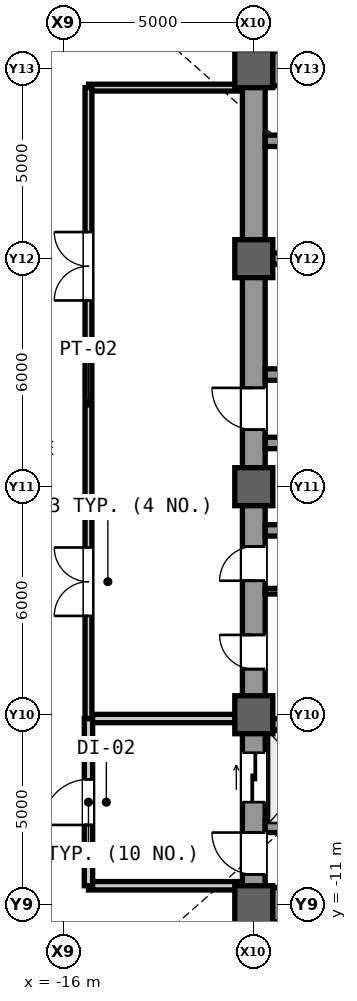
"""IFC4 building model, lengths in metres.
Left out: names, types, materials, properties, quantities, classifications, styles, units other than length and angle.
Written with IfcOpenShell. Run it as: python <this file> out.ifc"""

import sys

from ifc_helpers import new_model, si_unit, direction, frame, frame_2d, origin, origin_2d, place, context, subcontext, project, spatial, rectangle, extrude, source, transform, mapped, element, fill, save


model = new_model("IFC4")
c1 = context("Model", 3, precision=1e-05, world=origin(), true_north=direction((0.0, 1.0)))
c2 = subcontext(c1, "Body", "Model", "MODEL_VIEW")
j1 = project(units=[si_unit("LENGTHUNIT", "METRE"), si_unit("PLANEANGLEUNIT", "RADIAN")], contexts=[c1])
p1 = place(None, origin())
s1 = spatial("IfcSite", under=j1, at=p1, CompositionType="ELEMENT")
p2 = place(p1, origin())
s2 = spatial("IfcBuilding", under=s1, at=p2, CompositionType="ELEMENT")
p3 = place(p2, frame((0.0, 0.0, -9.6)))
s3 = spatial("IfcBuildingStorey", under=s2, at=p3, CompositionType="ELEMENT", Elevation=-9.6)
m1 = source(origin(), c2, "Body", "SweptSolid", [
    extrude(rectangle(XDim=22.0, YDim=0.6, at=frame_2d((11.0, 0.0))), origin(), (0.0, 0.0, 1.0), 4.48),
])
p4 = place(p3, frame((-11.0, -11.0, 0.0), z_axis=(0.0, 0.0, 1.0), x_axis=(0.0, 1.0, 0.0)))
e1 = element("IfcWall", 1, at=p4, inside=s3, PredefinedType="SHEAR", context=c2, shape_type="MappedRepresentation", body=[
    mapped(m1, transform((0.0, 0.0, 0.0), scale=1.0)),
])
m2 = source(origin(), c2, "Body", "SweptSolid", [
    extrude(rectangle(XDim=1.1, YDim=2.2, at=frame_2d((0.55, 1.1))), frame((0.0, 0.31, 0.0), z_axis=(0.0, -1.0, 0.0), x_axis=(1.0, 0.0, 0.0)), (0.0, 0.0, 1.0), 0.62),
])
p5 = place(p4, frame((0.8, 0.0, 0.0)))
e2 = element("IfcOpeningElement", 2, at=p5, cuts=e1, PredefinedType="OPENING", context=c2, shape_type="MappedRepresentation", body=[
    mapped(m2, transform((0.0, 0.0, 0.0), scale=1.0)),
])
p6 = place(p4, frame((12.5, 0.0, 0.0)))
e3 = element("IfcOpeningElement", 3, at=p6, cuts=e1, PredefinedType="OPENING", context=c2, shape_type="MappedRepresentation", body=[
    mapped(m2, transform((0.0, 0.0, 0.0), scale=1.0)),
])
m3 = source(origin(), c2, "Body", "SweptSolid", [
    extrude(rectangle(XDim=0.9, YDim=2.15, at=frame_2d((0.45, 1.075))), frame((0.0, 0.31, 0.0), z_axis=(0.0, -1.0, 0.0), x_axis=(1.0, 0.0, 0.0)), (0.0, 0.0, 1.0), 0.62),
])
p7 = place(p4, frame((6.2, 0.0, 0.0)))
e4 = element("IfcOpeningElement", 4, at=p7, cuts=e1, PredefinedType="OPENING", context=c2, shape_type="MappedRepresentation", body=[
    mapped(m3, transform((0.0, 0.0, 0.0), scale=1.0)),
])
p8 = place(p4, frame((8.525, 0.0, 0.0)))
e5 = element("IfcOpeningElement", 5, at=p8, cuts=e1, PredefinedType="OPENING", context=c2, shape_type="MappedRepresentation", body=[
    mapped(m3, transform((0.0, 0.0, 0.0), scale=1.0)),
])
m4 = source(origin(), c2, "Body", "SweptSolid", [
    extrude(rectangle(XDim=1.3, YDim=2.3, at=frame_2d((0.65, 1.15))), frame((0.0, 0.31, 0.0), z_axis=(0.0, -1.0, 0.0), x_axis=(1.0, 0.0, 0.0)), (0.0, 0.0, 1.0), 0.62),
])
p9 = place(p4, frame((2.7, 0.0, 0.0)))
e6 = element("IfcOpeningElement", 6, at=p9, cuts=e1, PredefinedType="OPENING", context=c2, shape_type="MappedRepresentation", body=[
    mapped(m4, transform((0.0, 0.0, 0.0), scale=1.0)),
])
m5 = source(origin(), c2, "Body", "SweptSolid", [
    extrude(rectangle(XDim=5.85, YDim=0.9, at=frame_2d((2.925, 0.0))), origin(), (0.0, 0.0, 1.0), 4.48),
])
for number, where, z_axis, x_axis in (
    (7, (-10.7, -11.0, 0.0), (0.0, 0.0, 1.0), (1.0, 0.0, 0.0)),
    (8, (-10.7, 11.0, 0.0), (0.0, 0.0, 1.0), (1.0, 0.0, 0.0)),
):
    element("IfcWall", number, at=place(p3, frame(where, z_axis=z_axis, x_axis=x_axis)), inside=s3, PredefinedType="SHEAR", context=c2, shape_type="MappedRepresentation", body=[
        mapped(m5, transform((0.0, 0.0, 0.0), scale=1.0)),
    ])
m6 = source(origin(), c2, "Body", "SweptSolid", [
    extrude(rectangle(XDim=5.6, YDim=0.3, at=frame_2d((2.8, 0.0))), origin(), (0.0, 0.0, 1.0), 4.48),
])
for number, where, z_axis, x_axis in (
    (9, (-10.7, -1.15, 0.0), (0.0, 0.0, 1.0), (1.0, 0.0, 0.0)),
    (10, (-10.7, 1.15, 0.0), (0.0, 0.0, 1.0), (1.0, 0.0, 0.0)),
):
    element("IfcWall", number, at=place(p3, frame(where, z_axis=z_axis, x_axis=x_axis)), inside=s3, PredefinedType="SHEAR", context=c2, shape_type="MappedRepresentation", body=[
        mapped(m6, transform((0.0, 0.0, 0.0), scale=1.0)),
    ])
m7 = source(origin(), c2, "Body", "SweptSolid", [
    extrude(rectangle(XDim=1.0, YDim=1.0, at=origin_2d()), origin(), (0.0, 0.0, 1.0), 4.8),
])
for number, where, z_axis, x_axis in (
    (11, (-11.0, -11.0, 0.0), (0.0, 0.0, 1.0), (1.0, 0.0, 0.0)),
    (12, (-11.0, -6.0, 0.0), (0.0, 0.0, 1.0), (1.0, 0.0, 0.0)),
    (13, (-11.0, 0.0, 0.0), (0.0, 0.0, 1.0), (1.0, 0.0, 0.0)),
    (14, (-11.0, 6.0, 0.0), (0.0, 0.0, 1.0), (1.0, 0.0, 0.0)),
    (15, (-11.0, 11.0, 0.0), (0.0, 0.0, 1.0), (1.0, 0.0, 0.0)),
):
    element("IfcColumn", number, at=place(p3, frame(where, z_axis=z_axis, x_axis=x_axis)), inside=s3, PredefinedType="COLUMN", context=c2, shape_type="MappedRepresentation", body=[
        mapped(m7, transform((0.0, 0.0, 0.0), scale=1.0)),
    ])
m8 = source(origin(), c2, "Body", "SweptSolid", [
    extrude(rectangle(XDim=2.2, YDim=0.3, at=frame_2d((1.1, 0.0))), origin(), (0.0, 0.0, 1.0), 4.48),
])
for number, where, z_axis, x_axis in (
    (16, (-10.7, -8.95, 0.0), (0.0, 0.0, 1.0), (1.0, 0.0, 0.0)),
    (17, (-10.7, -6.25, 0.0), (0.0, 0.0, 1.0), (1.0, 0.0, 0.0)),
    (18, (-10.7, 2.95, 0.0), (0.0, 0.0, 1.0), (1.0, 0.0, 0.0)),
    (19, (-10.7, 6.0, 0.0), (0.0, 0.0, 1.0), (1.0, 0.0, 0.0)),
    (20, (-10.7, 9.1, 0.0), (0.0, 0.0, 1.0), (1.0, 0.0, 0.0)),
):
    element("IfcWall", number, at=place(p3, frame(where, z_axis=z_axis, x_axis=x_axis)), inside=s3, PredefinedType="SHEAR", context=c2, shape_type="MappedRepresentation", body=[
        mapped(m8, transform((0.0, 0.0, 0.0), scale=1.0)),
    ])
m9 = source(origin(), c2, "Body", "SweptSolid", [
    extrude(rectangle(XDim=2.05, YDim=0.15, at=frame_2d((1.025, 0.0))), origin(), (0.0, 0.0, 1.0), 4.48),
])
p10 = place(p3, frame((-10.7, -2.75, 0.0), z_axis=(0.0, 0.0, 1.0), x_axis=(1.0, 0.0, 0.0)))
e21 = element("IfcWall", 21, at=p10, inside=s3, PredefinedType="PARTITIONING", context=c2, shape_type="MappedRepresentation", body=[
    mapped(m9, transform((0.0, 0.0, 0.0), scale=1.0)),
])
m10 = source(origin(), c2, "Body", "SweptSolid", [
    extrude(rectangle(XDim=4.05, YDim=0.22, at=frame_2d((2.025, 0.0))), origin(), (0.0, 0.0, 1.0), 4.48),
])
for number, where, z_axis, x_axis in (
    (22, (-15.35, -10.5, 0.0), (0.0, 0.0, 1.0), (1.0, 0.0, 0.0)),
    (23, (-15.35, -6.1, 0.0), (0.0, 0.0, 1.0), (1.0, 0.0, 0.0)),
):
    element("IfcWall", number, at=place(p3, frame(where, z_axis=z_axis, x_axis=x_axis)), inside=s3, PredefinedType="PARTITIONING", context=c2, shape_type="MappedRepresentation", body=[
        mapped(m10, transform((0.0, 0.0, 0.0), scale=1.0)),
    ])
m11 = source(origin(), c2, "Body", "SweptSolid", [
    extrude(rectangle(XDim=4.4, YDim=0.22, at=frame_2d((2.2, 0.0))), origin(), (0.0, 0.0, 1.0), 4.48),
])
p11 = place(p3, frame((-15.35, -10.5, 0.0), z_axis=(0.0, 0.0, 1.0), x_axis=(0.0, 1.0, 0.0)))
e24 = element("IfcWall", 24, at=p11, inside=s3, PredefinedType="PARTITIONING", context=c2, shape_type="MappedRepresentation", body=[
    mapped(m11, transform((0.0, 0.0, 0.0), scale=1.0)),
])
m12 = source(origin(), c2, "Body", "SweptSolid", [
    extrude(rectangle(XDim=1.2, YDim=2.2, at=frame_2d((0.6, 1.1))), frame((0.0, 0.12, 0.0), z_axis=(0.0, -1.0, 0.0), x_axis=(1.0, 0.0, 0.0)), (0.0, 0.0, 1.0), 0.24),
])
p12 = place(p11, frame((1.6, 0.0, 0.0)))
e25 = element("IfcOpeningElement", 25, at=p12, cuts=e24, PredefinedType="OPENING", context=c2, shape_type="MappedRepresentation", body=[
    mapped(m12, transform((0.0, 0.0, 0.0), scale=1.0)),
])
m13 = source(origin(), c2, "Body", "SweptSolid", [
    extrude(rectangle(XDim=4.05, YDim=0.18, at=frame_2d((2.025, 0.0))), origin(), (0.0, 0.0, 1.0), 4.48),
])
p13 = place(p3, frame((-15.35, 10.5, 0.0), z_axis=(0.0, 0.0, 1.0), x_axis=(1.0, 0.0, 0.0)))
e26 = element("IfcWall", 26, at=p13, inside=s3, PredefinedType="PARTITIONING", context=c2, shape_type="MappedRepresentation", body=[
    mapped(m13, transform((0.0, 0.0, 0.0), scale=1.0)),
])
m14 = source(origin(), c2, "Body", "SweptSolid", [
    extrude(rectangle(XDim=16.6, YDim=0.18, at=frame_2d((8.3, 0.0))), origin(), (0.0, 0.0, 1.0), 4.48),
])
p14 = place(p3, frame((-15.35, -6.1, 0.0), z_axis=(0.0, 0.0, 1.0), x_axis=(0.0, 1.0, 0.0)))
e27 = element("IfcWall", 27, at=p14, inside=s3, PredefinedType="PARTITIONING", context=c2, shape_type="MappedRepresentation", body=[
    mapped(m14, transform((0.0, 0.0, 0.0), scale=1.0)),
])
m15 = source(origin(), c2, "Body", "SweptSolid", [
    extrude(rectangle(XDim=1.8, YDim=2.25, at=frame_2d((0.9, 1.125))), frame((0.0, 0.1, 0.0), z_axis=(0.0, -1.0, 0.0), x_axis=(1.0, 0.0, 0.0)), (0.0, 0.0, 1.0), 0.2),
])
p15 = place(p14, frame((2.7, 0.0, 0.0)))
e28 = element("IfcOpeningElement", 28, at=p15, cuts=e27, PredefinedType="OPENING", context=c2, shape_type="MappedRepresentation", body=[
    mapped(m15, transform((0.0, 0.0, 0.0), scale=1.0)),
])
p16 = place(p14, frame((11.0, 0.0, 0.0)))
e29 = element("IfcOpeningElement", 29, at=p16, cuts=e27, PredefinedType="OPENING", context=c2, shape_type="MappedRepresentation", body=[
    mapped(m15, transform((0.0, 0.0, 0.0), scale=1.0)),
])
m16 = source(origin(), c2, "Body", "SweptSolid", [
    extrude(rectangle(XDim=1.1, YDim=2.2, at=frame_2d((0.55, 1.1))), frame((0.0, 0.025, 0.0), z_axis=(0.0, -1.0, 0.0), x_axis=(1.0, 0.0, 0.0)), (0.0, 0.0, 1.0), 0.05),
])
p17 = place(p5, origin())
e30 = element("IfcDoor", 30, at=p17, inside=s3, OperationType="SINGLE_SWING_RIGHT", PredefinedType="DOOR", context=c2, shape_type="MappedRepresentation", body=[
    mapped(m16, transform((0.0, 0.0, 0.0), scale=1.0)),
])
fill(e2, e30)
p18 = place(p6, origin())
e31 = element("IfcDoor", 31, at=p18, inside=s3, OperationType="SINGLE_SWING_RIGHT", PredefinedType="DOOR", context=c2, shape_type="MappedRepresentation", body=[
    mapped(m16, transform((0.0, 0.0, 0.0), scale=1.0)),
])
fill(e3, e31)
m17 = source(origin(), c2, "Body", "SweptSolid", [
    extrude(rectangle(XDim=0.9, YDim=2.15, at=frame_2d((0.45, 1.075))), frame((0.0, 0.025, 0.0), z_axis=(0.0, -1.0, 0.0), x_axis=(1.0, 0.0, 0.0)), (0.0, 0.0, 1.0), 0.05),
])
p19 = place(p7, origin())
e32 = element("IfcDoor", 32, at=p19, inside=s3, OperationType="SINGLE_SWING_RIGHT", PredefinedType="DOOR", context=c2, shape_type="MappedRepresentation", body=[
    mapped(m17, transform((0.0, 0.0, 0.0), scale=1.0)),
])
fill(e4, e32)
p20 = place(p8, origin())
e33 = element("IfcDoor", 33, at=p20, inside=s3, OperationType="SINGLE_SWING_LEFT", PredefinedType="DOOR", context=c2, shape_type="MappedRepresentation", body=[
    mapped(m17, transform((0.0, 0.0, 0.0), scale=1.0)),
])
fill(e5, e33)
m18 = source(origin(), c2, "Body", "SweptSolid", [
    extrude(rectangle(XDim=1.2, YDim=2.2, at=frame_2d((0.6, 1.1))), frame((0.0, 0.025, 0.0), z_axis=(0.0, -1.0, 0.0), x_axis=(1.0, 0.0, 0.0)), (0.0, 0.0, 1.0), 0.05),
])
p21 = place(p12, origin())
e34 = element("IfcDoor", 34, at=p21, inside=s3, OperationType="SINGLE_SWING_LEFT", PredefinedType="DOOR", context=c2, shape_type="MappedRepresentation", body=[
    mapped(m18, transform((0.0, 0.0, 0.0), scale=1.0)),
])
fill(e25, e34)
m19 = source(origin(), c2, "Body", "SweptSolid", [
    extrude(rectangle(XDim=1.8, YDim=2.25, at=frame_2d((0.9, 1.125))), frame((0.0, 0.025, 0.0), z_axis=(0.0, -1.0, 0.0), x_axis=(1.0, 0.0, 0.0)), (0.0, 0.0, 1.0), 0.05),
])
p22 = place(p15, origin())
e35 = element("IfcDoor", 35, at=p22, inside=s3, OperationType="SINGLE_SWING_LEFT", PredefinedType="DOOR", context=c2, shape_type="MappedRepresentation", body=[
    mapped(m19, transform((0.0, 0.0, 0.0), scale=1.0)),
])
fill(e28, e35)
p23 = place(p16, origin())
e36 = element("IfcDoor", 36, at=p23, inside=s3, OperationType="SINGLE_SWING_RIGHT", PredefinedType="DOOR", context=c2, shape_type="MappedRepresentation", body=[
    mapped(m19, transform((0.0, 0.0, 0.0), scale=1.0)),
])
fill(e29, e36)
m20 = source(origin(), c2, "Body", "SweptSolid", [
    extrude(rectangle(XDim=1.3, YDim=2.3, at=frame_2d((0.65, 1.15))), frame((0.0, 0.025, 0.0), z_axis=(0.0, -1.0, 0.0), x_axis=(1.0, 0.0, 0.0)), (0.0, 0.0, 1.0), 0.05),
])
p24 = place(p9, origin())
e37 = element("IfcDoor", 37, at=p24, inside=s3, OperationType="SLIDING_TO_LEFT", PredefinedType="DOOR", context=c2, shape_type="MappedRepresentation", body=[
    mapped(m20, transform((0.0, 0.0, 0.0), scale=1.0)),
])
fill(e6, e37)
save(model, sys.argv[1])
